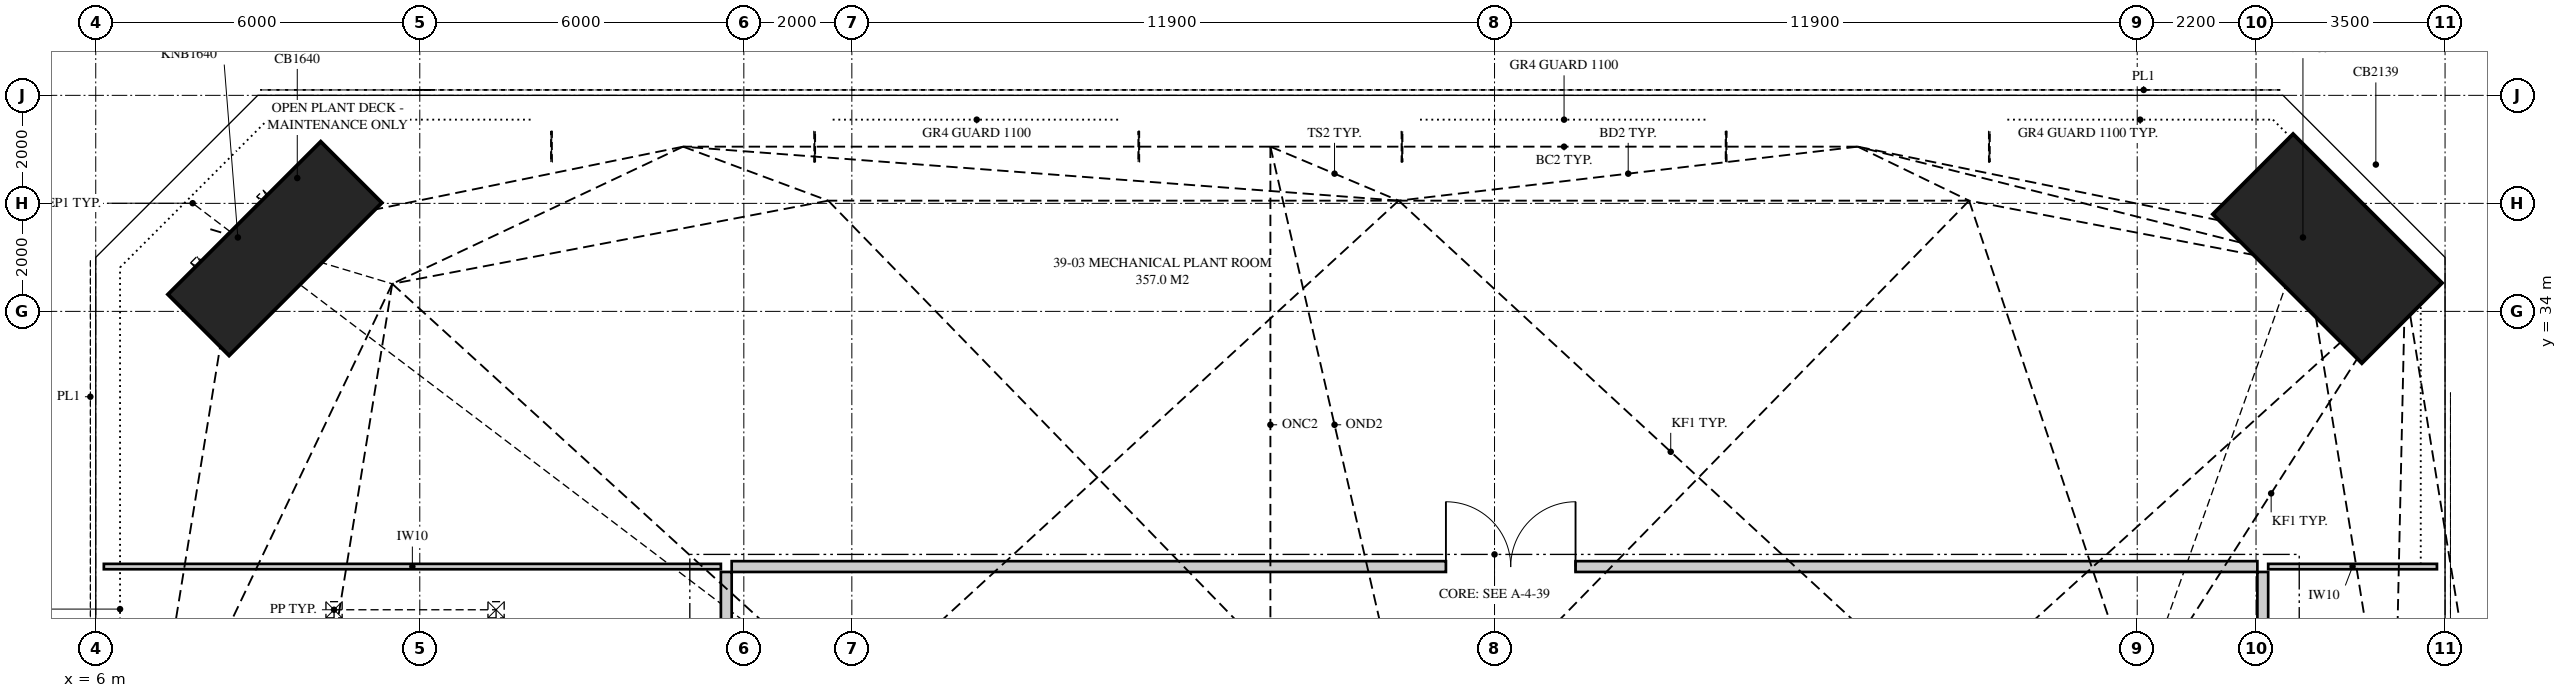
"""IFC4 building model, lengths in metres.
Left out: names, types, materials, properties, quantities, classifications, styles, units other than length and angle.
Written with IfcOpenShell. Run it as: python <this file> out.ifc"""

import sys

from ifc_helpers import new_model, si_unit, direction, frame, frame_2d, origin, origin_2d, place, context, subcontext, project, spatial, polyline, rectangle, hollow_rectangle, outline, extrude, element, fill, save


model = new_model("IFC4")
c1 = context("Model", 3, precision=1e-05, world=origin(), true_north=direction((0.0, 1.0)))
c2 = subcontext(c1, "Body", "Model", "MODEL_VIEW")
j1 = project(units=[si_unit("LENGTHUNIT", "METRE"), si_unit("PLANEANGLEUNIT", "RADIAN")], contexts=[c1])
p1 = place(None, origin())
s1 = spatial("IfcSite", under=j1, at=p1, CompositionType="ELEMENT")
p2 = place(p1, origin())
s2 = spatial("IfcBuilding", under=s1, at=p2, CompositionType="ELEMENT")
p3 = place(p2, frame((0.0, 0.0, 144.35)))
s3 = spatial("IfcBuildingStorey", under=s2, at=p3, CompositionType="ELEMENT", Elevation=144.35)
p4 = place(p3, frame((47.186, 35.225, 0.839), z_axis=(0.349327167669, -0.158588311436, 0.923482689282), x_axis=(-0.666102921381, -0.735188870478, 0.125714847386)))
e1 = element("IfcColumn", 1, at=p4, inside=s3, PredefinedType="COLUMN", context=c2, shape_type="SweptSolid", body=[
    extrude(hollow_rectangle(XDim=2.1, YDim=3.9, WallThickness=0.125, at=origin_2d()), origin(), (0.0, 0.0, 1.0), 4.506),
])
p5 = place(p3, frame((9.141, 35.216, 0.892), z_axis=(0.490909795378, -0.147453219775, 0.858641439007), x_axis=(0.544091146269, -0.717848892174, -0.434347548117)))
e2 = element("IfcColumn", 2, at=p5, inside=s3, PredefinedType="COLUMN", context=c2, shape_type="SweptSolid", body=[
    extrude(hollow_rectangle(XDim=1.6, YDim=4.0, WallThickness=0.125, at=origin_2d()), origin(), (0.0, 0.0, 1.0), 4.784),
])
p6 = place(p3, frame((17.775, 29.275, 0.0), z_axis=(0.0, 0.0, 1.0), x_axis=(1.0, 0.0, 0.0)))
e3 = element("IfcWall", 3, at=p6, inside=s3, PredefinedType="PARTITIONING", context=c2, shape_type="SweptSolid", body=[
    extrude(outline(polyline([(28.25, 0.0), (28.25, 4.72), (27.983, 4.72), (27.983, 4.141), (27.295, 4.141), (27.295, 4.72), (25.672, 4.72), (25.672, 4.141), (24.748, 4.141), (24.748, 4.72), (20.146, 4.72), (20.146, 4.141), (19.233, 4.141), (19.233, 4.72), (16.72, 4.72), (16.72, 4.141), (15.864, 4.141), (15.864, 4.72), (12.635, 4.72), (12.635, 4.208), (12.065, 4.208), (12.065, 4.72), (8.798, 4.72), (8.798, 4.141), (7.945, 4.141), (7.945, 4.72), (5.432, 4.72), (5.432, 4.141), (4.516, 4.141), (4.516, 4.72), (0.0, 4.72), (0.0, 0.0), (26.358, 0.0), (26.358, 2.2), (27.49, 2.2), (27.49, 0.0), (28.25, 0.0)]), holes=[polyline([(11.471, 3.377), (11.521, 3.481), (12.064, 3.539), (12.064, 3.042), (12.015, 2.938), (11.471, 2.88), (11.471, 3.377)])]), frame((0.0, 0.1, 0.0), z_axis=(0.0, -1.0, 0.0), x_axis=(1.0, 0.0, 0.0)), (0.0, 0.0, 1.0), 0.2),
])
p7 = place(p6, frame((13.225, 0.0, 0.0)))
e4 = element("IfcOpeningElement", 4, at=p7, cuts=e3, PredefinedType="OPENING", context=c2, shape_type="SweptSolid", body=[
    extrude(rectangle(XDim=2.4, YDim=2.4, at=frame_2d((1.2, 1.2))), frame((0.0, 0.11, 0.0), z_axis=(0.0, -1.0, 0.0), x_axis=(1.0, 0.0, 0.0)), (0.0, 0.0, 1.0), 0.22),
])
p8 = place(p3, frame((17.675, 27.625, 0.0), z_axis=(0.0, 0.0, 1.0), x_axis=(0.0, 1.0, 0.0)))
e5 = element("IfcWall", 5, at=p8, inside=s3, PredefinedType="PARTITIONING", context=c2, shape_type="SweptSolid", body=[
    extrude(outline(polyline([(0.184, 2.2), (1.55, 2.2), (1.55, 4.141), (0.834, 4.141), (0.834, 4.72), (0.0, 4.72), (0.0, 0.0), (0.184, 0.0), (0.184, 2.2)])), frame((0.0, 0.1, 0.0), z_axis=(0.0, -1.0, 0.0), x_axis=(1.0, 0.0, 0.0)), (0.0, 0.0, 1.0), 0.2),
])
p9 = place(p3, frame((46.125, 27.625, 0.0), z_axis=(0.0, 0.0, 1.0), x_axis=(0.0, 1.0, 0.0)))
e6 = element("IfcWall", 6, at=p9, inside=s3, PredefinedType="PARTITIONING", context=c2, shape_type="SweptSolid", body=[
    extrude(rectangle(XDim=1.55, YDim=0.2, at=frame_2d((0.775, 0.0))), origin(), (0.0, 0.0, 1.0), 4.72),
])
p10 = place(p3, frame((6.15, 29.275, 0.0), z_axis=(0.0, 0.0, 1.0), x_axis=(1.0, 0.0, 0.0)))
e7 = element("IfcWall", 7, at=p10, inside=s3, PredefinedType="PARTITIONING", context=c2, shape_type="SweptSolid", body=[
    extrude(outline(polyline([(9.626, 2.2), (11.425, 2.2), (11.425, 4.141), (10.676, 4.141), (10.676, 4.72), (5.209, 4.72), (5.209, 3.32), (3.775, 3.32), (3.775, 4.72), (0.0, 4.72), (0.0, 0.0), (9.626, 0.0), (9.626, 2.2)]), holes=[polyline([(2.142, 0.429), (2.142, 1.773), (2.195, 1.831), (3.54, 2.106), (3.54, 0.762), (3.487, 0.704), (2.142, 0.429)])]), frame((0.0, 0.05, 0.0), z_axis=(0.0, -1.0, 0.0), x_axis=(1.0, 0.0, 0.0)), (0.0, 0.0, 1.0), 0.1),
])
p11 = place(p3, frame((46.225, 29.275, 0.0), z_axis=(0.0, 0.0, 1.0), x_axis=(1.0, 0.0, 0.0)))
e8 = element("IfcWall", 8, at=p11, inside=s3, PredefinedType="PARTITIONING", context=c2, shape_type="SweptSolid", body=[
    extrude(outline(polyline([(0.0, 0.0), (3.125, 0.0), (3.125, 0.546), (1.808, 0.546), (1.808, 1.912), (1.811, 1.975), (3.031, 1.989), (3.125, 1.989), (3.125, 3.32), (2.666, 3.32), (2.666, 4.72), (0.0, 4.72), (0.0, 0.0)])), frame((0.0, 0.05, 0.0), z_axis=(0.0, -1.0, 0.0), x_axis=(1.0, 0.0, 0.0)), (0.0, 0.0, 1.0), 0.1),
])
p12 = place(p7, origin())
e9 = element("IfcDoor", 9, at=p12, inside=s3, OperationType="DOUBLE_DOOR_SINGLE_SWING", PredefinedType="DOOR", context=c2, shape_type="SweptSolid", body=[
    extrude(rectangle(XDim=2.4, YDim=2.4, at=frame_2d((1.2, 1.2))), frame((0.0, 0.025, 0.0), z_axis=(0.0, -1.0, 0.0), x_axis=(1.0, 0.0, 0.0)), (0.0, 0.0, 1.0), 0.05),
])
fill(e4, e9)
save(model, sys.argv[1])
